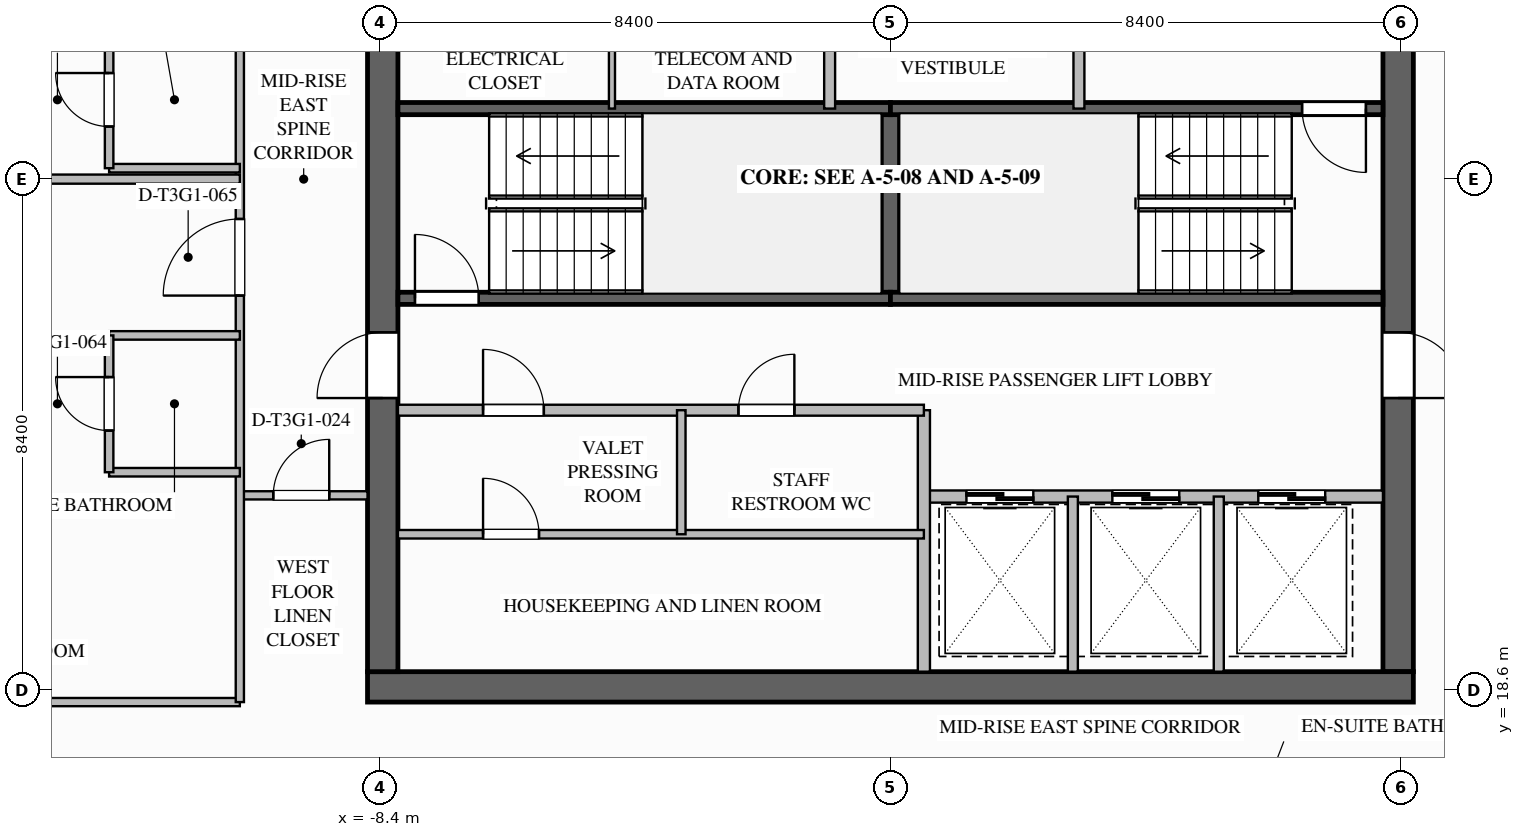
"""IFC4 building model, lengths in metres.
Left out: names, types, materials, properties, quantities, classifications, styles, units other than length and angle.
Written with IfcOpenShell. Run it as: python <this file> out.ifc"""

import sys

from ifc_helpers import new_model, si_unit, direction, frame, frame_2d, origin, place, context, subcontext, project, spatial, rectangle, extrude, element, fill, save


model = new_model("IFC4")
c1 = context("Model", 3, precision=1e-05, world=origin(), true_north=direction((0.0, 1.0)))
c2 = subcontext(c1, "Body", "Model", "MODEL_VIEW")
j1 = project(units=[si_unit("LENGTHUNIT", "METRE"), si_unit("PLANEANGLEUNIT", "RADIAN")], contexts=[c1])
p1 = place(None, origin())
s1 = spatial("IfcSite", under=j1, at=p1, CompositionType="ELEMENT")
p2 = place(p1, origin())
s2 = spatial("IfcBuilding", under=s1, at=p2, CompositionType="ELEMENT")
p3 = place(p2, frame((0.0, 0.0, 150.4)))
s3 = spatial("IfcBuildingStorey", under=s2, at=p3, CompositionType="ELEMENT", Elevation=150.4)
p4 = place(p3, frame((8.35, 35.1, 0.0), z_axis=(0.0, 0.0, 1.0), x_axis=(0.0, -1.0, 0.0)))
e1 = element("IfcWall", 1, at=p4, inside=s3, PredefinedType="SHEAR", context=c2, shape_type="SweptSolid", body=[
    extrude(rectangle(XDim=16.2, YDim=0.5, at=frame_2d((8.1, 0.0))), origin(), (0.0, 0.0, 1.0), 3.55),
])
p5 = place(p4, frame((3.08, 0.0, 0.0)))
e2 = element("IfcOpeningElement", 2, at=p5, cuts=e1, PredefinedType="OPENING", context=c2, shape_type="SweptSolid", body=[
    extrude(rectangle(XDim=1.12, YDim=2.1, at=frame_2d((0.56, 1.05))), frame((0.0, 0.26, 0.0), z_axis=(0.0, -1.0, 0.0), x_axis=(1.0, 0.0, 0.0)), (0.0, 0.0, 1.0), 0.52),
])
p6 = place(p4, frame((10.62, 0.0, 0.0)))
e3 = element("IfcOpeningElement", 3, at=p6, cuts=e1, PredefinedType="OPENING", context=c2, shape_type="SweptSolid", body=[
    extrude(rectangle(XDim=1.08, YDim=2.04, at=frame_2d((0.54, 1.02))), frame((0.0, 0.26, 0.0), z_axis=(0.0, -1.0, 0.0), x_axis=(1.0, 0.0, 0.0)), (0.0, 0.0, 1.0), 0.52),
])
p7 = place(p3, frame((8.6, 18.65, 0.0), z_axis=(0.0, 0.0, 1.0), x_axis=(-1.0, 0.0, 0.0)))
e4 = element("IfcWall", 4, at=p7, inside=s3, PredefinedType="SHEAR", context=c2, shape_type="SweptSolid", body=[
    extrude(rectangle(XDim=17.2, YDim=0.5, at=frame_2d((8.6, 0.0))), origin(), (0.0, 0.0, 1.0), 3.55),
])
p8 = place(p3, frame((-8.35, 18.9, 0.0), z_axis=(0.0, 0.0, 1.0), x_axis=(0.0, 1.0, 0.0)))
e5 = element("IfcWall", 5, at=p8, inside=s3, PredefinedType="SHEAR", context=c2, shape_type="SweptSolid", body=[
    extrude(rectangle(XDim=16.2, YDim=0.5, at=frame_2d((8.1, 0.0))), origin(), (0.0, 0.0, 1.0), 3.55),
])
p9 = place(p8, frame((12.02, 0.0, 0.0)))
e6 = element("IfcOpeningElement", 6, at=p9, cuts=e5, PredefinedType="OPENING", context=c2, shape_type="SweptSolid", body=[
    extrude(rectangle(XDim=1.08, YDim=2.04, at=frame_2d((0.54, 1.02))), frame((0.0, 0.26, 0.0), z_axis=(0.0, -1.0, 0.0), x_axis=(1.0, 0.0, 0.0)), (0.0, 0.0, 1.0), 0.52),
])
p10 = place(p8, frame((4.5, 0.0, 0.0)))
e7 = element("IfcOpeningElement", 7, at=p10, cuts=e5, PredefinedType="OPENING", context=c2, shape_type="SweptSolid", body=[
    extrude(rectangle(XDim=1.08, YDim=2.04, at=frame_2d((0.54, 1.02))), frame((0.0, 0.26, 0.0), z_axis=(0.0, -1.0, 0.0), x_axis=(1.0, 0.0, 0.0)), (0.0, 0.0, 1.0), 0.52),
])
p11 = place(p3, frame((0.0, 25.04, 0.0), z_axis=(0.0, 0.0, 1.0), x_axis=(0.0, 1.0, 0.0)))
e8 = element("IfcWall", 8, at=p11, inside=s3, PredefinedType="SOLIDWALL", context=c2, shape_type="SweptSolid", body=[
    extrude(rectangle(XDim=3.12, YDim=0.3, at=frame_2d((1.56, 0.0))), origin(), (0.0, 0.0, 1.0), 3.29),
])
p12 = place(p3, frame((-8.1, 25.04, 0.0), z_axis=(0.0, 0.0, 1.0), x_axis=(1.0, 0.0, 0.0)))
e9 = element("IfcWall", 9, at=p12, inside=s3, PredefinedType="SOLIDWALL", context=c2, shape_type="SweptSolid", body=[
    extrude(rectangle(XDim=8.1, YDim=0.2, at=frame_2d((4.05, 0.0))), origin(), (0.0, 0.0, 1.0), 3.29),
])
p13 = place(p12, frame((0.28, 0.0, 0.0)))
e10 = element("IfcOpeningElement", 10, at=p13, cuts=e9, PredefinedType="OPENING", context=c2, shape_type="SweptSolid", body=[
    extrude(rectangle(XDim=1.05, YDim=2.1, at=frame_2d((0.525, 1.05))), frame((0.0, 0.11, 0.0), z_axis=(0.0, -1.0, 0.0), x_axis=(1.0, 0.0, 0.0)), (0.0, 0.0, 1.0), 0.22),
])
for number, where, z_axis, x_axis in (
    (11, (-8.1, 28.16, 0.0), (0.0, 0.0, 1.0), (1.0, 0.0, 0.0)),
    (12, (0.0, 25.04, 0.0), (0.0, 0.0, 1.0), (1.0, 0.0, 0.0)),
):
    element("IfcWall", number, at=place(p3, frame(where, z_axis=z_axis, x_axis=x_axis)), inside=s3, PredefinedType="SOLIDWALL", context=c2, shape_type="SweptSolid", body=[
        extrude(rectangle(XDim=8.1, YDim=0.2, at=frame_2d((4.05, 0.0))), origin(), (0.0, 0.0, 1.0), 3.29),
    ])
p14 = place(p3, frame((8.1, 28.16, 0.0), z_axis=(0.0, 0.0, 1.0), x_axis=(-1.0, 0.0, 0.0)))
e13 = element("IfcWall", 13, at=p14, inside=s3, PredefinedType="SOLIDWALL", context=c2, shape_type="SweptSolid", body=[
    extrude(rectangle(XDim=8.1, YDim=0.2, at=frame_2d((4.05, 0.0))), origin(), (0.0, 0.0, 1.0), 3.29),
])
p15 = place(p14, frame((0.28, 0.0, 0.0)))
e14 = element("IfcOpeningElement", 14, at=p15, cuts=e13, PredefinedType="OPENING", context=c2, shape_type="SweptSolid", body=[
    extrude(rectangle(XDim=1.05, YDim=2.1, at=frame_2d((0.525, 1.05))), frame((0.0, 0.11, 0.0), z_axis=(0.0, -1.0, 0.0), x_axis=(1.0, 0.0, 0.0)), (0.0, 0.0, 1.0), 0.22),
])
p16 = place(p3, frame((3.1, 28.16, 0.0), z_axis=(0.0, 0.0, 1.0), x_axis=(0.0, 1.0, 0.0)))
e15 = element("IfcWall", 15, at=p16, inside=s3, PredefinedType="SOLIDWALL", context=c2, shape_type="SweptSolid", body=[
    extrude(rectangle(XDim=4.06, YDim=0.18, at=frame_2d((2.03, 0.0))), origin(), (0.0, 0.0, 1.0), 3.29),
])
p17 = place(p16, frame((1.4, 0.0, 0.0)))
e16 = element("IfcOpeningElement", 16, at=p17, cuts=e15, PredefinedType="OPENING", context=c2, shape_type="SweptSolid", body=[
    extrude(rectangle(XDim=1.12, YDim=2.1, at=frame_2d((0.56, 1.05))), frame((0.0, 0.1, 0.0), z_axis=(0.0, -1.0, 0.0), x_axis=(1.0, 0.0, 0.0)), (0.0, 0.0, 1.0), 0.2),
])
p18 = place(p3, frame((-1.0, 28.16, 0.0), z_axis=(0.0, 0.0, 1.0), x_axis=(0.0, 1.0, 0.0)))
e17 = element("IfcWall", 17, at=p18, inside=s3, PredefinedType="SOLIDWALL", context=c2, shape_type="SweptSolid", body=[
    extrude(rectangle(XDim=4.02, YDim=0.18, at=frame_2d((2.01, 0.0))), origin(), (0.0, 0.0, 1.0), 3.29),
])
p19 = place(p18, frame((2.49, 0.0, 0.0)))
e18 = element("IfcOpeningElement", 18, at=p19, cuts=e17, PredefinedType="OPENING", context=c2, shape_type="SweptSolid", body=[
    extrude(rectangle(XDim=1.0, YDim=2.1, at=frame_2d((0.5, 1.05))), frame((0.0, 0.1, 0.0), z_axis=(0.0, -1.0, 0.0), x_axis=(1.0, 0.0, 0.0)), (0.0, 0.0, 1.0), 0.2),
])
p20 = place(p3, frame((-4.58, 28.16, 0.0), z_axis=(0.0, 0.0, 1.0), x_axis=(0.0, 1.0, 0.0)))
e19 = element("IfcWall", 19, at=p20, inside=s3, PredefinedType="PARTITIONING", context=c2, shape_type="SweptSolid", body=[
    extrude(rectangle(XDim=1.98, YDim=0.1, at=frame_2d((0.99, 0.0))), origin(), (0.0, 0.0, 1.0), 3.29),
])
p21 = place(p3, frame((8.1, 21.78, 0.0), z_axis=(0.0, 0.0, 1.0), x_axis=(-1.0, 0.0, 0.0)))
e20 = element("IfcWall", 20, at=p21, inside=s3, PredefinedType="SOLIDWALL", context=c2, shape_type="SweptSolid", body=[
    extrude(rectangle(XDim=7.55, YDim=0.2, at=frame_2d((3.775, 0.0))), origin(), (0.0, 0.0, 1.0), 3.29),
])
p22 = place(p21, frame((5.75, 0.0, 0.0)))
e21 = element("IfcOpeningElement", 21, at=p22, cuts=e20, PredefinedType="OPENING", context=c2, shape_type="SweptSolid", body=[
    extrude(rectangle(XDim=1.1, YDim=2.2, at=frame_2d((0.55, 1.1))), frame((0.0, 0.11, 0.0), z_axis=(0.0, -1.0, 0.0), x_axis=(1.0, 0.0, 0.0)), (0.0, 0.0, 1.0), 0.22),
])
p23 = place(p21, frame((3.35, 0.0, 0.0)))
e22 = element("IfcOpeningElement", 22, at=p23, cuts=e20, PredefinedType="OPENING", context=c2, shape_type="SweptSolid", body=[
    extrude(rectangle(XDim=1.1, YDim=2.2, at=frame_2d((0.55, 1.1))), frame((0.0, 0.11, 0.0), z_axis=(0.0, -1.0, 0.0), x_axis=(1.0, 0.0, 0.0)), (0.0, 0.0, 1.0), 0.22),
])
p24 = place(p21, frame((0.95, 0.0, 0.0)))
e23 = element("IfcOpeningElement", 23, at=p24, cuts=e20, PredefinedType="OPENING", context=c2, shape_type="SweptSolid", body=[
    extrude(rectangle(XDim=1.1, YDim=2.2, at=frame_2d((0.55, 1.1))), frame((0.0, 0.11, 0.0), z_axis=(0.0, -1.0, 0.0), x_axis=(1.0, 0.0, 0.0)), (0.0, 0.0, 1.0), 0.22),
])
p25 = place(p3, frame((0.55, 18.9, 0.0), z_axis=(0.0, 0.0, 1.0), x_axis=(0.0, 1.0, 0.0)))
e24 = element("IfcWall", 24, at=p25, inside=s3, PredefinedType="SOLIDWALL", context=c2, shape_type="SweptSolid", body=[
    extrude(rectangle(XDim=4.3, YDim=0.2, at=frame_2d((2.15, 0.0))), origin(), (0.0, 0.0, 1.0), 3.29),
])
for number, where, z_axis, x_axis in (
    (25, (3.0, 18.9, 0.0), (0.0, 0.0, 1.0), (0.0, 1.0, 0.0)),
    (26, (5.4, 18.9, 0.0), (0.0, 0.0, 1.0), (0.0, 1.0, 0.0)),
):
    element("IfcWall", number, at=place(p3, frame(where, z_axis=z_axis, x_axis=x_axis)), inside=s3, PredefinedType="PARTITIONING", context=c2, shape_type="SweptSolid", body=[
        extrude(rectangle(XDim=2.88, YDim=0.165, at=frame_2d((1.44, 0.0))), origin(), (0.0, 0.0, 1.0), 3.29),
    ])
p26 = place(p3, frame((-8.1, 23.2, 0.0), z_axis=(0.0, 0.0, 1.0), x_axis=(1.0, 0.0, 0.0)))
e27 = element("IfcWall", 27, at=p26, inside=s3, PredefinedType="SOLIDWALL", context=c2, shape_type="SweptSolid", body=[
    extrude(rectangle(XDim=8.65, YDim=0.18, at=frame_2d((4.325, 0.0))), origin(), (0.0, 0.0, 1.0), 3.29),
])
p27 = place(p26, frame((1.4, 0.0, 0.0)))
e28 = element("IfcOpeningElement", 28, at=p27, cuts=e27, PredefinedType="OPENING", context=c2, shape_type="SweptSolid", body=[
    extrude(rectangle(XDim=1.0, YDim=2.1, at=frame_2d((0.5, 1.05))), frame((0.0, 0.1, 0.0), z_axis=(0.0, -1.0, 0.0), x_axis=(1.0, 0.0, 0.0)), (0.0, 0.0, 1.0), 0.2),
])
p28 = place(p26, frame((5.6, 0.0, 0.0)))
e29 = element("IfcOpeningElement", 29, at=p28, cuts=e27, PredefinedType="OPENING", context=c2, shape_type="SweptSolid", body=[
    extrude(rectangle(XDim=0.92, YDim=2.1, at=frame_2d((0.46, 1.05))), frame((0.0, 0.1, 0.0), z_axis=(0.0, -1.0, 0.0), x_axis=(1.0, 0.0, 0.0)), (0.0, 0.0, 1.0), 0.2),
])
p29 = place(p3, frame((-8.1, 21.16, 0.0), z_axis=(0.0, 0.0, 1.0), x_axis=(1.0, 0.0, 0.0)))
e30 = element("IfcWall", 30, at=p29, inside=s3, PredefinedType="PLUMBINGWALL", context=c2, shape_type="SweptSolid", body=[
    extrude(rectangle(XDim=8.65, YDim=0.14, at=frame_2d((4.325, 0.0))), origin(), (0.0, 0.0, 1.0), 3.29),
])
p30 = place(p29, frame((1.4, 0.0, 0.0)))
e31 = element("IfcOpeningElement", 31, at=p30, cuts=e30, PredefinedType="OPENING", context=c2, shape_type="SweptSolid", body=[
    extrude(rectangle(XDim=0.92, YDim=2.1, at=frame_2d((0.46, 1.05))), frame((0.0, 0.08, 0.0), z_axis=(0.0, -1.0, 0.0), x_axis=(1.0, 0.0, 0.0)), (0.0, 0.0, 1.0), 0.16),
])
p31 = place(p3, frame((-3.44, 21.16, 0.0), z_axis=(0.0, 0.0, 1.0), x_axis=(0.0, 1.0, 0.0)))
e32 = element("IfcWall", 32, at=p31, inside=s3, PredefinedType="PLUMBINGWALL", context=c2, shape_type="SweptSolid", body=[
    extrude(rectangle(XDim=2.04, YDim=0.14, at=frame_2d((1.02, 0.0))), origin(), (0.0, 0.0, 1.0), 3.29),
])
p32 = place(p3, frame((-10.7, 21.8, 0.0), z_axis=(0.0, 0.0, 1.0), x_axis=(1.0, 0.0, 0.0)))
e33 = element("IfcWall", 33, at=p32, inside=s3, PredefinedType="PARTITIONING", context=c2, shape_type="SweptSolid", body=[
    extrude(rectangle(XDim=2.1, YDim=0.135, at=frame_2d((1.05, 0.0))), origin(), (0.0, 0.0, 1.0), 3.29),
])
p33 = place(p32, frame((0.55, 0.0, 0.0)))
e34 = element("IfcOpeningElement", 34, at=p33, cuts=e33, PredefinedType="OPENING", context=c2, shape_type="SweptSolid", body=[
    extrude(rectangle(XDim=0.92, YDim=2.1, at=frame_2d((0.46, 1.05))), frame((0.0, 0.077, 0.0), z_axis=(0.0, -1.0, 0.0), x_axis=(1.0, 0.0, 0.0)), (0.0, 0.0, 1.0), 0.155),
])
p34 = place(p3, frame((-16.2, 18.4, 0.0), z_axis=(0.0, 0.0, 1.0), x_axis=(1.0, 0.0, 0.0)))
e35 = element("IfcWall", 35, at=p34, inside=s3, PredefinedType="PARTITIONING", context=c2, shape_type="SweptSolid", body=[
    extrude(rectangle(XDim=5.5, YDim=0.135, at=frame_2d((2.75, 0.0))), origin(), (0.0, 0.0, 1.0), 2.667),
])
p35 = place(p3, frame((-10.7, 18.4, 0.0), z_axis=(0.0, 0.0, 1.0), x_axis=(0.0, 1.0, 0.0)))
e36 = element("IfcWall", 36, at=p35, inside=s3, PredefinedType="PARTITIONING", context=c2, shape_type="SweptSolid", body=[
    extrude(rectangle(XDim=17.2, YDim=0.135, at=frame_2d((8.6, 0.0))), origin(), (0.0, 0.0, 1.0), 3.29),
])
p36 = place(p35, frame((6.685, 0.0, 0.0)))
e37 = element("IfcOpeningElement", 37, at=p36, cuts=e36, PredefinedType="OPENING", context=c2, shape_type="SweptSolid", body=[
    extrude(rectangle(XDim=1.26, YDim=2.2, at=frame_2d((0.63, 1.1))), frame((0.0, 0.077, 0.0), z_axis=(0.0, -1.0, 0.0), x_axis=(1.0, 0.0, 0.0)), (0.0, 0.0, 1.0), 0.155),
])
p37 = place(p35, frame((11.685, 0.0, 0.0)))
e38 = element("IfcOpeningElement", 38, at=p37, cuts=e36, PredefinedType="OPENING", context=c2, shape_type="SweptSolid", body=[
    extrude(rectangle(XDim=1.26, YDim=2.2, at=frame_2d((0.63, 1.1))), frame((0.0, 0.077, 0.0), z_axis=(0.0, -1.0, 0.0), x_axis=(1.0, 0.0, 0.0)), (0.0, 0.0, 1.0), 0.155),
])
p38 = place(p3, frame((-26.2, 27.0, 0.0), z_axis=(0.0, 0.0, 1.0), x_axis=(1.0, 0.0, 0.0)))
e39 = element("IfcWall", 39, at=p38, inside=s3, PredefinedType="PARTITIONING", context=c2, shape_type="SweptSolid", body=[
    extrude(rectangle(XDim=15.5, YDim=0.15, at=frame_2d((7.75, 0.0))), origin(), (0.0, 0.0, 1.0), 2.58),
])
for number, where, z_axis, x_axis in (
    (40, (-10.7, 22.18, 0.0), (0.0, 0.0, 1.0), (-1.0, 0.0, 0.0)),
    (41, (-10.7, 24.43, 0.0), (0.0, 0.0, 1.0), (-1.0, 0.0, 0.0)),
):
    element("IfcWall", number, at=place(p3, frame(where, z_axis=z_axis, x_axis=x_axis)), inside=s3, PredefinedType="PLUMBINGWALL", context=c2, shape_type="SweptSolid", body=[
        extrude(rectangle(XDim=2.15, YDim=0.14, at=frame_2d((1.075, 0.0))), origin(), (0.0, 0.0, 1.0), 3.29),
    ])
p39 = place(p3, frame((-12.85, 22.18, 0.0), z_axis=(0.0, 0.0, 1.0), x_axis=(0.0, 1.0, 0.0)))
e42 = element("IfcWall", 42, at=p39, inside=s3, PredefinedType="PLUMBINGWALL", context=c2, shape_type="SweptSolid", body=[
    extrude(rectangle(XDim=2.25, YDim=0.14, at=frame_2d((1.125, 0.0))), origin(), (0.0, 0.0, 1.0), 3.29),
])
p40 = place(p39, frame((0.685, 0.0, 0.0)))
e43 = element("IfcOpeningElement", 43, at=p40, cuts=e42, PredefinedType="OPENING", context=c2, shape_type="SweptSolid", body=[
    extrude(rectangle(XDim=0.88, YDim=2.1, at=frame_2d((0.44, 1.05))), frame((0.0, 0.08, 0.0), z_axis=(0.0, -1.0, 0.0), x_axis=(1.0, 0.0, 0.0)), (0.0, 0.0, 1.0), 0.16),
])
p41 = place(p3, frame((-10.7, 27.18, 0.0), z_axis=(0.0, 0.0, 1.0), x_axis=(-1.0, 0.0, 0.0)))
e44 = element("IfcWall", 44, at=p41, inside=s3, PredefinedType="PLUMBINGWALL", context=c2, shape_type="SweptSolid", body=[
    extrude(rectangle(XDim=2.15, YDim=0.14, at=frame_2d((1.075, 0.0))), origin(), (0.0, 0.0, 1.0), 2.667),
])
p42 = place(p3, frame((-12.85, 27.18, 0.0), z_axis=(0.0, 0.0, 1.0), x_axis=(0.0, 1.0, 0.0)))
e45 = element("IfcWall", 45, at=p42, inside=s3, PredefinedType="PLUMBINGWALL", context=c2, shape_type="SweptSolid", body=[
    extrude(rectangle(XDim=2.25, YDim=0.14, at=frame_2d((1.125, 0.0))), origin(), (0.0, 0.0, 1.0), 3.29),
])
p43 = place(p42, frame((0.685, 0.0, 0.0)))
e46 = element("IfcOpeningElement", 46, at=p43, cuts=e45, PredefinedType="OPENING", context=c2, shape_type="SweptSolid", body=[
    extrude(rectangle(XDim=0.88, YDim=2.1, at=frame_2d((0.44, 1.05))), frame((0.0, 0.08, 0.0), z_axis=(0.0, -1.0, 0.0), x_axis=(1.0, 0.0, 0.0)), (0.0, 0.0, 1.0), 0.16),
])
p44 = place(p13, origin())
e47 = element("IfcDoor", 47, at=p44, inside=s3, OperationType="SINGLE_SWING_LEFT", PredefinedType="DOOR", context=c2, shape_type="SweptSolid", body=[
    extrude(rectangle(XDim=1.05, YDim=2.1, at=frame_2d((0.525, 1.05))), frame((0.0, 0.025, 0.0), z_axis=(0.0, -1.0, 0.0), x_axis=(1.0, 0.0, 0.0)), (0.0, 0.0, 1.0), 0.05),
])
fill(e10, e47)
p45 = place(p15, origin())
e48 = element("IfcDoor", 48, at=p45, inside=s3, OperationType="SINGLE_SWING_LEFT", PredefinedType="DOOR", context=c2, shape_type="SweptSolid", body=[
    extrude(rectangle(XDim=1.05, YDim=2.1, at=frame_2d((0.525, 1.05))), frame((0.0, 0.025, 0.0), z_axis=(0.0, -1.0, 0.0), x_axis=(1.0, 0.0, 0.0)), (0.0, 0.0, 1.0), 0.05),
])
fill(e14, e48)
p46 = place(p22, origin())
e49 = element("IfcDoor", 49, at=p46, inside=s3, OperationType="SLIDING_TO_LEFT", PredefinedType="DOOR", context=c2, shape_type="SweptSolid", body=[
    extrude(rectangle(XDim=1.1, YDim=2.2, at=frame_2d((0.55, 1.1))), frame((0.0, 0.025, 0.0), z_axis=(0.0, -1.0, 0.0), x_axis=(1.0, 0.0, 0.0)), (0.0, 0.0, 1.0), 0.05),
])
fill(e21, e49)
p47 = place(p23, origin())
e50 = element("IfcDoor", 50, at=p47, inside=s3, OperationType="SLIDING_TO_LEFT", PredefinedType="DOOR", context=c2, shape_type="SweptSolid", body=[
    extrude(rectangle(XDim=1.1, YDim=2.2, at=frame_2d((0.55, 1.1))), frame((0.0, 0.025, 0.0), z_axis=(0.0, -1.0, 0.0), x_axis=(1.0, 0.0, 0.0)), (0.0, 0.0, 1.0), 0.05),
])
fill(e22, e50)
p48 = place(p24, origin())
e51 = element("IfcDoor", 51, at=p48, inside=s3, OperationType="SLIDING_TO_LEFT", PredefinedType="DOOR", context=c2, shape_type="SweptSolid", body=[
    extrude(rectangle(XDim=1.1, YDim=2.2, at=frame_2d((0.55, 1.1))), frame((0.0, 0.025, 0.0), z_axis=(0.0, -1.0, 0.0), x_axis=(1.0, 0.0, 0.0)), (0.0, 0.0, 1.0), 0.05),
])
fill(e23, e51)
p49 = place(p10, origin())
e52 = element("IfcDoor", 52, at=p49, inside=s3, OperationType="SINGLE_SWING_LEFT", PredefinedType="DOOR", context=c2, shape_type="SweptSolid", body=[
    extrude(rectangle(XDim=1.08, YDim=2.04, at=frame_2d((0.54, 1.02))), frame((0.0, 0.025, 0.0), z_axis=(0.0, -1.0, 0.0), x_axis=(1.0, 0.0, 0.0)), (0.0, 0.0, 1.0), 0.05),
])
fill(e7, e52)
p50 = place(p6, origin())
e53 = element("IfcDoor", 53, at=p50, inside=s3, OperationType="SINGLE_SWING_RIGHT", PredefinedType="DOOR", context=c2, shape_type="SweptSolid", body=[
    extrude(rectangle(XDim=1.08, YDim=2.04, at=frame_2d((0.54, 1.02))), frame((0.0, 0.025, 0.0), z_axis=(0.0, -1.0, 0.0), x_axis=(1.0, 0.0, 0.0)), (0.0, 0.0, 1.0), 0.05),
])
fill(e3, e53)
p51 = place(p27, origin())
e54 = element("IfcDoor", 54, at=p51, inside=s3, OperationType="SINGLE_SWING_LEFT", PredefinedType="DOOR", context=c2, shape_type="SweptSolid", body=[
    extrude(rectangle(XDim=1.0, YDim=2.1, at=frame_2d((0.5, 1.05))), frame((0.0, 0.025, 0.0), z_axis=(0.0, -1.0, 0.0), x_axis=(1.0, 0.0, 0.0)), (0.0, 0.0, 1.0), 0.05),
])
fill(e28, e54)
p52 = place(p28, origin())
e55 = element("IfcDoor", 55, at=p52, inside=s3, OperationType="SINGLE_SWING_RIGHT", PredefinedType="DOOR", context=c2, shape_type="SweptSolid", body=[
    extrude(rectangle(XDim=0.92, YDim=2.1, at=frame_2d((0.46, 1.05))), frame((0.0, 0.025, 0.0), z_axis=(0.0, -1.0, 0.0), x_axis=(1.0, 0.0, 0.0)), (0.0, 0.0, 1.0), 0.05),
])
fill(e29, e55)
p53 = place(p30, origin())
e56 = element("IfcDoor", 56, at=p53, inside=s3, OperationType="SINGLE_SWING_LEFT", PredefinedType="DOOR", context=c2, shape_type="SweptSolid", body=[
    extrude(rectangle(XDim=0.92, YDim=2.1, at=frame_2d((0.46, 1.05))), frame((0.0, 0.025, 0.0), z_axis=(0.0, -1.0, 0.0), x_axis=(1.0, 0.0, 0.0)), (0.0, 0.0, 1.0), 0.05),
])
fill(e31, e56)
p54 = place(p33, origin())
e57 = element("IfcDoor", 57, at=p54, inside=s3, OperationType="SINGLE_SWING_RIGHT", PredefinedType="DOOR", context=c2, shape_type="SweptSolid", body=[
    extrude(rectangle(XDim=0.92, YDim=2.1, at=frame_2d((0.46, 1.05))), frame((0.0, 0.025, 0.0), z_axis=(0.0, -1.0, 0.0), x_axis=(1.0, 0.0, 0.0)), (0.0, 0.0, 1.0), 0.05),
])
fill(e34, e57)
p55 = place(p40, origin())
e58 = element("IfcDoor", 58, at=p55, inside=s3, OperationType="SINGLE_SWING_RIGHT", PredefinedType="DOOR", context=c2, shape_type="SweptSolid", body=[
    extrude(rectangle(XDim=0.88, YDim=2.1, at=frame_2d((0.44, 1.05))), frame((0.0, 0.025, 0.0), z_axis=(0.0, -1.0, 0.0), x_axis=(1.0, 0.0, 0.0)), (0.0, 0.0, 1.0), 0.05),
])
fill(e43, e58)
p56 = place(p36, origin())
e59 = element("IfcDoor", 59, at=p56, inside=s3, OperationType="SINGLE_SWING_LEFT", PredefinedType="DOOR", context=c2, shape_type="SweptSolid", body=[
    extrude(rectangle(XDim=1.26, YDim=2.2, at=frame_2d((0.63, 1.1))), frame((0.0, 0.025, 0.0), z_axis=(0.0, -1.0, 0.0), x_axis=(1.0, 0.0, 0.0)), (0.0, 0.0, 1.0), 0.05),
])
fill(e37, e59)
p57 = place(p43, origin())
e60 = element("IfcDoor", 60, at=p57, inside=s3, OperationType="SINGLE_SWING_RIGHT", PredefinedType="DOOR", context=c2, shape_type="SweptSolid", body=[
    extrude(rectangle(XDim=0.88, YDim=2.1, at=frame_2d((0.44, 1.05))), frame((0.0, 0.025, 0.0), z_axis=(0.0, -1.0, 0.0), x_axis=(1.0, 0.0, 0.0)), (0.0, 0.0, 1.0), 0.05),
])
fill(e46, e60)
save(model, sys.argv[1])
